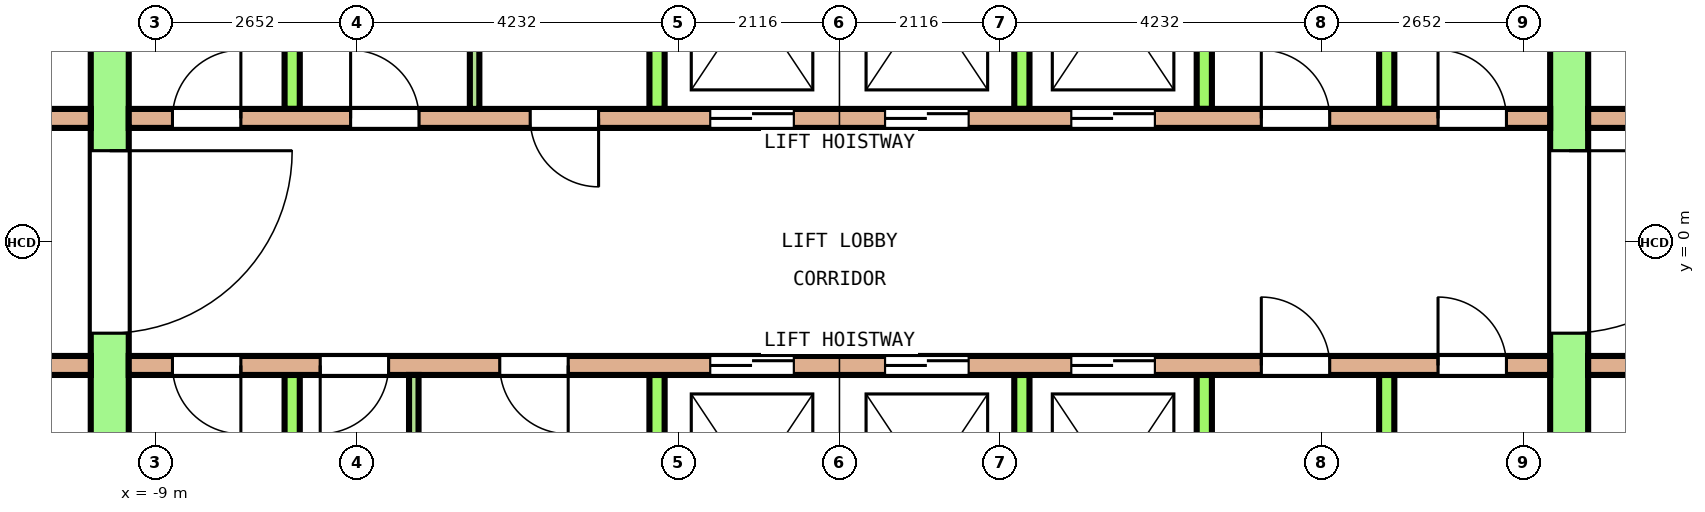
"""IFC4 building model, lengths in metres.
Left out: names, types, materials, properties, quantities, classifications, styles, units other than length and angle.
Written with IfcOpenShell. Run it as: python <this file> out.ifc"""

import sys

from ifc_helpers import new_model, si_unit, direction, frame, frame_2d, origin, place, context, subcontext, project, spatial, rectangle, extrude, element, fill, save


model = new_model("IFC4")
c1 = context("Model", 3, precision=1e-05, world=origin(), true_north=direction((0.0, 1.0)))
c2 = subcontext(c1, "Body", "Model", "MODEL_VIEW")
j1 = project(units=[si_unit("LENGTHUNIT", "METRE"), si_unit("PLANEANGLEUNIT", "RADIAN")], contexts=[c1])
p1 = place(None, origin())
s1 = spatial("IfcSite", under=j1, at=p1, CompositionType="ELEMENT")
p2 = place(p1, origin())
s2 = spatial("IfcBuilding", under=s1, at=p2, CompositionType="ELEMENT")
p3 = place(p2, frame((0.0, 0.0, 237.4)))
s3 = spatial("IfcBuildingStorey", under=s2, at=p3, CompositionType="ELEMENT", Elevation=237.4)
p4 = place(p3, frame((-9.6, -7.8, 0.0), z_axis=(0.0, 0.0, 1.0), x_axis=(0.0, 1.0, 0.0)))
e1 = element("IfcWall", 1, at=p4, inside=s3, PredefinedType="SHEAR", context=c2, shape_type="SweptSolid", body=[
    extrude(rectangle(XDim=15.6, YDim=0.5, at=frame_2d((7.8, 0.0))), origin(), (0.0, 0.0, 1.0), 3.7),
])
p5 = place(p4, frame((6.6, 0.0, 0.0)))
e2 = element("IfcOpeningElement", 2, at=p5, cuts=e1, PredefinedType="OPENING", context=c2, shape_type="SweptSolid", body=[
    extrude(rectangle(XDim=2.4, YDim=2.1, at=frame_2d((1.2, 1.05))), frame((0.0, 0.26, 0.0), z_axis=(0.0, -1.0, 0.0), x_axis=(1.0, 0.0, 0.0)), (0.0, 0.0, 1.0), 0.52),
])
p6 = place(p4, frame((13.5, 0.0, 0.0)))
e3 = element("IfcOpeningElement", 3, at=p6, cuts=e1, PredefinedType="OPENING", context=c2, shape_type="SweptSolid", body=[
    extrude(rectangle(XDim=1.2, YDim=2.1, at=frame_2d((0.6, 1.05))), frame((0.0, 0.26, 0.0), z_axis=(0.0, -1.0, 0.0), x_axis=(1.0, 0.0, 0.0)), (0.0, 0.0, 1.0), 0.52),
])
p7 = place(p4, frame((0.9, 0.0, 0.0)))
e4 = element("IfcOpeningElement", 4, at=p7, cuts=e1, PredefinedType="OPENING", context=c2, shape_type="SweptSolid", body=[
    extrude(rectangle(XDim=1.2, YDim=2.1, at=frame_2d((0.6, 1.05))), frame((0.0, 0.26, 0.0), z_axis=(0.0, -1.0, 0.0), x_axis=(1.0, 0.0, 0.0)), (0.0, 0.0, 1.0), 0.52),
])
p8 = place(p3, frame((9.6, -7.8, 0.0), z_axis=(0.0, 0.0, 1.0), x_axis=(0.0, 1.0, 0.0)))
e5 = element("IfcWall", 5, at=p8, inside=s3, PredefinedType="SHEAR", context=c2, shape_type="SweptSolid", body=[
    extrude(rectangle(XDim=15.6, YDim=0.5, at=frame_2d((7.8, 0.0))), origin(), (0.0, 0.0, 1.0), 3.7),
])
p9 = place(p8, frame((6.6, 0.0, 0.0)))
e6 = element("IfcOpeningElement", 6, at=p9, cuts=e5, PredefinedType="OPENING", context=c2, shape_type="SweptSolid", body=[
    extrude(rectangle(XDim=2.4, YDim=2.1, at=frame_2d((1.2, 1.05))), frame((0.0, 0.26, 0.0), z_axis=(0.0, -1.0, 0.0), x_axis=(1.0, 0.0, 0.0)), (0.0, 0.0, 1.0), 0.52),
])
p10 = place(p8, frame((13.5, 0.0, 0.0)))
e7 = element("IfcOpeningElement", 7, at=p10, cuts=e5, PredefinedType="OPENING", context=c2, shape_type="SweptSolid", body=[
    extrude(rectangle(XDim=1.2, YDim=2.1, at=frame_2d((0.6, 1.05))), frame((0.0, 0.26, 0.0), z_axis=(0.0, -1.0, 0.0), x_axis=(1.0, 0.0, 0.0)), (0.0, 0.0, 1.0), 0.52),
])
p11 = place(p8, frame((1.0, 0.0, 0.0)))
e8 = element("IfcOpeningElement", 8, at=p11, cuts=e5, PredefinedType="OPENING", context=c2, shape_type="SweptSolid", body=[
    extrude(rectangle(XDim=1.0, YDim=2.1, at=frame_2d((0.5, 1.05))), frame((0.0, 0.26, 0.0), z_axis=(0.0, -1.0, 0.0), x_axis=(1.0, 0.0, 0.0)), (0.0, 0.0, 1.0), 0.52),
])
p12 = place(p3, frame((-12.9, 1.625, 0.0), z_axis=(0.0, 0.0, 1.0), x_axis=(1.0, 0.0, 0.0)))
e9 = element("IfcWall", 9, at=p12, inside=s3, PredefinedType="SOLIDWALL", context=c2, shape_type="SweptSolid", body=[
    extrude(rectangle(XDim=3.05, YDim=0.25, at=frame_2d((1.525, 0.0))), origin(), (0.0, 0.0, 1.0), 3.7),
])
p13 = place(p12, frame((1.075, 0.0, 0.0)))
e10 = element("IfcOpeningElement", 10, at=p13, cuts=e9, PredefinedType="OPENING", context=c2, shape_type="SweptSolid", body=[
    extrude(rectangle(XDim=0.9, YDim=2.1, at=frame_2d((0.45, 1.05))), frame((0.0, 0.135, 0.0), z_axis=(0.0, -1.0, 0.0), x_axis=(1.0, 0.0, 0.0)), (0.0, 0.0, 1.0), 0.27),
])
p14 = place(p3, frame((-9.35, 1.625, 0.0), z_axis=(0.0, 0.0, 1.0), x_axis=(1.0, 0.0, 0.0)))
e11 = element("IfcWall", 11, at=p14, inside=s3, PredefinedType="SOLIDWALL", context=c2, shape_type="SweptSolid", body=[
    extrude(rectangle(XDim=18.7, YDim=0.25, at=frame_2d((9.35, 0.0))), origin(), (0.0, 0.0, 1.0), 3.7),
])
p15 = place(p14, frame((7.65, 0.0, 0.0)))
e12 = element("IfcOpeningElement", 12, at=p15, cuts=e11, PredefinedType="OPENING", context=c2, shape_type="SweptSolid", body=[
    extrude(rectangle(XDim=1.1, YDim=2.1, at=frame_2d((0.55, 1.05))), frame((0.0, 0.135, 0.0), z_axis=(0.0, -1.0, 0.0), x_axis=(1.0, 0.0, 0.0)), (0.0, 0.0, 1.0), 0.27),
])
p16 = place(p14, frame((9.95, 0.0, 0.0)))
e13 = element("IfcOpeningElement", 13, at=p16, cuts=e11, PredefinedType="OPENING", context=c2, shape_type="SweptSolid", body=[
    extrude(rectangle(XDim=1.1, YDim=2.1, at=frame_2d((0.55, 1.05))), frame((0.0, 0.135, 0.0), z_axis=(0.0, -1.0, 0.0), x_axis=(1.0, 0.0, 0.0)), (0.0, 0.0, 1.0), 0.27),
])
p17 = place(p14, frame((12.4, 0.0, 0.0)))
e14 = element("IfcOpeningElement", 14, at=p17, cuts=e11, PredefinedType="OPENING", context=c2, shape_type="SweptSolid", body=[
    extrude(rectangle(XDim=1.1, YDim=2.1, at=frame_2d((0.55, 1.05))), frame((0.0, 0.135, 0.0), z_axis=(0.0, -1.0, 0.0), x_axis=(1.0, 0.0, 0.0)), (0.0, 0.0, 1.0), 0.27),
])
p18 = place(p14, frame((0.575, 0.0, 0.0)))
e15 = element("IfcOpeningElement", 15, at=p18, cuts=e11, PredefinedType="OPENING", context=c2, shape_type="SweptSolid", body=[
    extrude(rectangle(XDim=0.9, YDim=2.1, at=frame_2d((0.45, 1.05))), frame((0.0, 0.135, 0.0), z_axis=(0.0, -1.0, 0.0), x_axis=(1.0, 0.0, 0.0)), (0.0, 0.0, 1.0), 0.27),
])
p19 = place(p14, frame((2.919, 0.0, 0.0)))
e16 = element("IfcOpeningElement", 16, at=p19, cuts=e11, PredefinedType="OPENING", context=c2, shape_type="SweptSolid", body=[
    extrude(rectangle(XDim=0.9, YDim=2.1, at=frame_2d((0.45, 1.05))), frame((0.0, 0.135, 0.0), z_axis=(0.0, -1.0, 0.0), x_axis=(1.0, 0.0, 0.0)), (0.0, 0.0, 1.0), 0.27),
])
p20 = place(p14, frame((5.281, 0.0, 0.0)))
e17 = element("IfcOpeningElement", 17, at=p20, cuts=e11, PredefinedType="OPENING", context=c2, shape_type="SweptSolid", body=[
    extrude(rectangle(XDim=0.9, YDim=2.1, at=frame_2d((0.45, 1.05))), frame((0.0, 0.135, 0.0), z_axis=(0.0, -1.0, 0.0), x_axis=(1.0, 0.0, 0.0)), (0.0, 0.0, 1.0), 0.27),
])
p21 = place(p14, frame((14.9, 0.0, 0.0)))
e18 = element("IfcOpeningElement", 18, at=p21, cuts=e11, PredefinedType="OPENING", context=c2, shape_type="SweptSolid", body=[
    extrude(rectangle(XDim=0.9, YDim=2.1, at=frame_2d((0.45, 1.05))), frame((0.0, 0.135, 0.0), z_axis=(0.0, -1.0, 0.0), x_axis=(1.0, 0.0, 0.0)), (0.0, 0.0, 1.0), 0.27),
])
p22 = place(p14, frame((17.225, 0.0, 0.0)))
e19 = element("IfcOpeningElement", 19, at=p22, cuts=e11, PredefinedType="OPENING", context=c2, shape_type="SweptSolid", body=[
    extrude(rectangle(XDim=0.9, YDim=2.1, at=frame_2d((0.45, 1.05))), frame((0.0, 0.135, 0.0), z_axis=(0.0, -1.0, 0.0), x_axis=(1.0, 0.0, 0.0)), (0.0, 0.0, 1.0), 0.27),
])
p23 = place(p3, frame((9.85, 1.625, 0.0), z_axis=(0.0, 0.0, 1.0), x_axis=(1.0, 0.0, 0.0)))
e20 = element("IfcWall", 20, at=p23, inside=s3, PredefinedType="SOLIDWALL", context=c2, shape_type="SweptSolid", body=[
    extrude(rectangle(XDim=3.05, YDim=0.25, at=frame_2d((1.525, 0.0))), origin(), (0.0, 0.0, 1.0), 3.7),
])
p24 = place(p23, frame((1.075, 0.0, 0.0)))
e21 = element("IfcOpeningElement", 21, at=p24, cuts=e20, PredefinedType="OPENING", context=c2, shape_type="SweptSolid", body=[
    extrude(rectangle(XDim=0.9, YDim=2.1, at=frame_2d((0.45, 1.05))), frame((0.0, 0.135, 0.0), z_axis=(0.0, -1.0, 0.0), x_axis=(1.0, 0.0, 0.0)), (0.0, 0.0, 1.0), 0.27),
])
for number, where, z_axis, x_axis in (
    (22, (-7.2, 1.75, 0.0), (0.0, 0.0, 1.0), (0.0, 1.0, 0.0)),
    (23, (-2.4, 1.75, 0.0), (0.0, 0.0, 1.0), (0.0, 1.0, 0.0)),
    (24, (2.4, 1.75, 0.0), (0.0, 0.0, 1.0), (0.0, 1.0, 0.0)),
    (25, (4.8, 1.75, 0.0), (0.0, 0.0, 1.0), (0.0, 1.0, 0.0)),
    (26, (7.2, 1.75, 0.0), (0.0, 0.0, 1.0), (0.0, 1.0, 0.0)),
):
    element("IfcWall", number, at=place(p3, frame(where, z_axis=z_axis, x_axis=x_axis)), inside=s3, PredefinedType="SOLIDWALL", context=c2, shape_type="SweptSolid", body=[
        extrude(rectangle(XDim=2.9, YDim=0.2, at=frame_2d((1.45, 0.0))), origin(), (0.0, 0.0, 1.0), 3.7),
    ])
p25 = place(p3, frame((-12.9, -1.625, 0.0), z_axis=(0.0, 0.0, 1.0), x_axis=(1.0, 0.0, 0.0)))
e27 = element("IfcWall", 27, at=p25, inside=s3, PredefinedType="SOLIDWALL", context=c2, shape_type="SweptSolid", body=[
    extrude(rectangle(XDim=3.05, YDim=0.25, at=frame_2d((1.525, 0.0))), origin(), (0.0, 0.0, 1.0), 3.7),
])
p26 = place(p25, frame((1.075, 0.0, 0.0)))
e28 = element("IfcOpeningElement", 28, at=p26, cuts=e27, PredefinedType="OPENING", context=c2, shape_type="SweptSolid", body=[
    extrude(rectangle(XDim=0.9, YDim=2.1, at=frame_2d((0.45, 1.05))), frame((0.0, 0.135, 0.0), z_axis=(0.0, -1.0, 0.0), x_axis=(1.0, 0.0, 0.0)), (0.0, 0.0, 1.0), 0.27),
])
p27 = place(p3, frame((-9.35, -1.625, 0.0), z_axis=(0.0, 0.0, 1.0), x_axis=(1.0, 0.0, 0.0)))
e29 = element("IfcWall", 29, at=p27, inside=s3, PredefinedType="SOLIDWALL", context=c2, shape_type="SweptSolid", body=[
    extrude(rectangle(XDim=18.7, YDim=0.25, at=frame_2d((9.35, 0.0))), origin(), (0.0, 0.0, 1.0), 3.7),
])
p28 = place(p27, frame((7.65, 0.0, 0.0)))
e30 = element("IfcOpeningElement", 30, at=p28, cuts=e29, PredefinedType="OPENING", context=c2, shape_type="SweptSolid", body=[
    extrude(rectangle(XDim=1.1, YDim=2.1, at=frame_2d((0.55, 1.05))), frame((0.0, 0.135, 0.0), z_axis=(0.0, -1.0, 0.0), x_axis=(1.0, 0.0, 0.0)), (0.0, 0.0, 1.0), 0.27),
])
p29 = place(p27, frame((9.95, 0.0, 0.0)))
e31 = element("IfcOpeningElement", 31, at=p29, cuts=e29, PredefinedType="OPENING", context=c2, shape_type="SweptSolid", body=[
    extrude(rectangle(XDim=1.1, YDim=2.1, at=frame_2d((0.55, 1.05))), frame((0.0, 0.135, 0.0), z_axis=(0.0, -1.0, 0.0), x_axis=(1.0, 0.0, 0.0)), (0.0, 0.0, 1.0), 0.27),
])
p30 = place(p27, frame((12.4, 0.0, 0.0)))
e32 = element("IfcOpeningElement", 32, at=p30, cuts=e29, PredefinedType="OPENING", context=c2, shape_type="SweptSolid", body=[
    extrude(rectangle(XDim=1.1, YDim=2.1, at=frame_2d((0.55, 1.05))), frame((0.0, 0.135, 0.0), z_axis=(0.0, -1.0, 0.0), x_axis=(1.0, 0.0, 0.0)), (0.0, 0.0, 1.0), 0.27),
])
p31 = place(p27, frame((0.575, 0.0, 0.0)))
e33 = element("IfcOpeningElement", 33, at=p31, cuts=e29, PredefinedType="OPENING", context=c2, shape_type="SweptSolid", body=[
    extrude(rectangle(XDim=0.9, YDim=2.1, at=frame_2d((0.45, 1.05))), frame((0.0, 0.135, 0.0), z_axis=(0.0, -1.0, 0.0), x_axis=(1.0, 0.0, 0.0)), (0.0, 0.0, 1.0), 0.27),
])
p32 = place(p27, frame((2.519, 0.0, 0.0)))
e34 = element("IfcOpeningElement", 34, at=p32, cuts=e29, PredefinedType="OPENING", context=c2, shape_type="SweptSolid", body=[
    extrude(rectangle(XDim=0.9, YDim=2.1, at=frame_2d((0.45, 1.05))), frame((0.0, 0.135, 0.0), z_axis=(0.0, -1.0, 0.0), x_axis=(1.0, 0.0, 0.0)), (0.0, 0.0, 1.0), 0.27),
])
p33 = place(p27, frame((4.881, 0.0, 0.0)))
e35 = element("IfcOpeningElement", 35, at=p33, cuts=e29, PredefinedType="OPENING", context=c2, shape_type="SweptSolid", body=[
    extrude(rectangle(XDim=0.9, YDim=2.1, at=frame_2d((0.45, 1.05))), frame((0.0, 0.135, 0.0), z_axis=(0.0, -1.0, 0.0), x_axis=(1.0, 0.0, 0.0)), (0.0, 0.0, 1.0), 0.27),
])
p34 = place(p27, frame((14.9, 0.0, 0.0)))
e36 = element("IfcOpeningElement", 36, at=p34, cuts=e29, PredefinedType="OPENING", context=c2, shape_type="SweptSolid", body=[
    extrude(rectangle(XDim=0.9, YDim=2.1, at=frame_2d((0.45, 1.05))), frame((0.0, 0.135, 0.0), z_axis=(0.0, -1.0, 0.0), x_axis=(1.0, 0.0, 0.0)), (0.0, 0.0, 1.0), 0.27),
])
p35 = place(p27, frame((17.225, 0.0, 0.0)))
e37 = element("IfcOpeningElement", 37, at=p35, cuts=e29, PredefinedType="OPENING", context=c2, shape_type="SweptSolid", body=[
    extrude(rectangle(XDim=0.9, YDim=2.1, at=frame_2d((0.45, 1.05))), frame((0.0, 0.135, 0.0), z_axis=(0.0, -1.0, 0.0), x_axis=(1.0, 0.0, 0.0)), (0.0, 0.0, 1.0), 0.27),
])
p36 = place(p3, frame((9.85, -1.625, 0.0), z_axis=(0.0, 0.0, 1.0), x_axis=(1.0, 0.0, 0.0)))
e38 = element("IfcWall", 38, at=p36, inside=s3, PredefinedType="SOLIDWALL", context=c2, shape_type="SweptSolid", body=[
    extrude(rectangle(XDim=3.05, YDim=0.25, at=frame_2d((1.525, 0.0))), origin(), (0.0, 0.0, 1.0), 3.7),
])
p37 = place(p36, frame((1.075, 0.0, 0.0)))
e39 = element("IfcOpeningElement", 39, at=p37, cuts=e38, PredefinedType="OPENING", context=c2, shape_type="SweptSolid", body=[
    extrude(rectangle(XDim=0.9, YDim=2.1, at=frame_2d((0.45, 1.05))), frame((0.0, 0.135, 0.0), z_axis=(0.0, -1.0, 0.0), x_axis=(1.0, 0.0, 0.0)), (0.0, 0.0, 1.0), 0.27),
])
for number, where, z_axis, x_axis in (
    (40, (-7.2, -4.65, 0.0), (0.0, 0.0, 1.0), (0.0, 1.0, 0.0)),
    (41, (-2.4, -4.65, 0.0), (0.0, 0.0, 1.0), (0.0, 1.0, 0.0)),
    (42, (2.4, -4.65, 0.0), (0.0, 0.0, 1.0), (0.0, 1.0, 0.0)),
    (43, (4.8, -4.65, 0.0), (0.0, 0.0, 1.0), (0.0, 1.0, 0.0)),
    (44, (7.2, -4.65, 0.0), (0.0, 0.0, 1.0), (0.0, 1.0, 0.0)),
):
    element("IfcWall", number, at=place(p3, frame(where, z_axis=z_axis, x_axis=x_axis)), inside=s3, PredefinedType="SOLIDWALL", context=c2, shape_type="SweptSolid", body=[
        extrude(rectangle(XDim=2.9, YDim=0.2, at=frame_2d((1.45, 0.0))), origin(), (0.0, 0.0, 1.0), 3.7),
    ])
for number, where, z_axis, x_axis in (
    (45, (-4.8, 1.75, 0.0), (0.0, 0.0, 1.0), (0.0, 1.0, 0.0)),
    (46, (-5.6, -4.65, 0.0), (0.0, 0.0, 1.0), (0.0, 1.0, 0.0)),
):
    element("IfcWall", number, at=place(p3, frame(where, z_axis=z_axis, x_axis=x_axis)), inside=s3, PredefinedType="PARTITIONING", context=c2, shape_type="SweptSolid", body=[
        extrude(rectangle(XDim=2.9, YDim=0.125, at=frame_2d((1.45, 0.0))), origin(), (0.0, 0.0, 1.0), 3.7),
    ])
p38 = place(p15, origin())
e47 = element("IfcDoor", 47, at=p38, inside=s3, OperationType="DOUBLE_DOOR_SLIDING", PredefinedType="DOOR", context=c2, shape_type="SweptSolid", body=[
    extrude(rectangle(XDim=1.1, YDim=2.1, at=frame_2d((0.55, 1.05))), frame((0.0, 0.075, 0.0), z_axis=(0.0, -1.0, 0.0), x_axis=(1.0, 0.0, 0.0)), (0.0, 0.0, 1.0), 0.15),
])
fill(e12, e47)
p39 = place(p16, origin())
e48 = element("IfcDoor", 48, at=p39, inside=s3, OperationType="DOUBLE_DOOR_SLIDING", PredefinedType="DOOR", context=c2, shape_type="SweptSolid", body=[
    extrude(rectangle(XDim=1.1, YDim=2.1, at=frame_2d((0.55, 1.05))), frame((0.0, 0.075, 0.0), z_axis=(0.0, -1.0, 0.0), x_axis=(1.0, 0.0, 0.0)), (0.0, 0.0, 1.0), 0.15),
])
fill(e13, e48)
p40 = place(p17, origin())
e49 = element("IfcDoor", 49, at=p40, inside=s3, OperationType="DOUBLE_DOOR_SLIDING", PredefinedType="DOOR", context=c2, shape_type="SweptSolid", body=[
    extrude(rectangle(XDim=1.1, YDim=2.1, at=frame_2d((0.55, 1.05))), frame((0.0, 0.075, 0.0), z_axis=(0.0, -1.0, 0.0), x_axis=(1.0, 0.0, 0.0)), (0.0, 0.0, 1.0), 0.15),
])
fill(e14, e49)
p41 = place(p28, origin())
e50 = element("IfcDoor", 50, at=p41, inside=s3, OperationType="DOUBLE_DOOR_SLIDING", PredefinedType="DOOR", context=c2, shape_type="SweptSolid", body=[
    extrude(rectangle(XDim=1.1, YDim=2.1, at=frame_2d((0.55, 1.05))), frame((0.0, 0.075, 0.0), z_axis=(0.0, -1.0, 0.0), x_axis=(1.0, 0.0, 0.0)), (0.0, 0.0, 1.0), 0.15),
])
fill(e30, e50)
p42 = place(p29, origin())
e51 = element("IfcDoor", 51, at=p42, inside=s3, OperationType="DOUBLE_DOOR_SLIDING", PredefinedType="DOOR", context=c2, shape_type="SweptSolid", body=[
    extrude(rectangle(XDim=1.1, YDim=2.1, at=frame_2d((0.55, 1.05))), frame((0.0, 0.075, 0.0), z_axis=(0.0, -1.0, 0.0), x_axis=(1.0, 0.0, 0.0)), (0.0, 0.0, 1.0), 0.15),
])
fill(e31, e51)
p43 = place(p30, origin())
e52 = element("IfcDoor", 52, at=p43, inside=s3, OperationType="DOUBLE_DOOR_SLIDING", PredefinedType="DOOR", context=c2, shape_type="SweptSolid", body=[
    extrude(rectangle(XDim=1.1, YDim=2.1, at=frame_2d((0.55, 1.05))), frame((0.0, 0.075, 0.0), z_axis=(0.0, -1.0, 0.0), x_axis=(1.0, 0.0, 0.0)), (0.0, 0.0, 1.0), 0.15),
])
fill(e32, e52)
p44 = place(p5, origin())
e53 = element("IfcDoor", 53, at=p44, inside=s3, OperationType="DOUBLE_DOOR_SINGLE_SWING", PredefinedType="DOOR", context=c2, shape_type="SweptSolid", body=[
    extrude(rectangle(XDim=2.4, YDim=2.1, at=frame_2d((1.2, 1.05))), frame((0.0, 0.2, 0.0), z_axis=(0.0, -1.0, 0.0), x_axis=(1.0, 0.0, 0.0)), (0.0, 0.0, 1.0), 0.4),
])
fill(e2, e53)
p45 = place(p9, origin())
e54 = element("IfcDoor", 54, at=p45, inside=s3, OperationType="DOUBLE_DOOR_SINGLE_SWING", PredefinedType="DOOR", context=c2, shape_type="SweptSolid", body=[
    extrude(rectangle(XDim=2.4, YDim=2.1, at=frame_2d((1.2, 1.05))), frame((0.0, 0.2, 0.0), z_axis=(0.0, -1.0, 0.0), x_axis=(1.0, 0.0, 0.0)), (0.0, 0.0, 1.0), 0.4),
])
fill(e6, e54)
p46 = place(p18, origin())
e55 = element("IfcDoor", 55, at=p46, inside=s3, OperationType="SINGLE_SWING_LEFT", PredefinedType="DOOR", context=c2, shape_type="SweptSolid", body=[
    extrude(rectangle(XDim=0.9, YDim=2.1, at=frame_2d((0.45, 1.05))), frame((0.0, 0.075, 0.0), z_axis=(0.0, -1.0, 0.0), x_axis=(1.0, 0.0, 0.0)), (0.0, 0.0, 1.0), 0.15),
])
fill(e15, e55)
p47 = place(p19, origin())
e56 = element("IfcDoor", 56, at=p47, inside=s3, OperationType="SINGLE_SWING_RIGHT", PredefinedType="DOOR", context=c2, shape_type="SweptSolid", body=[
    extrude(rectangle(XDim=0.9, YDim=2.1, at=frame_2d((0.45, 1.05))), frame((0.0, 0.075, 0.0), z_axis=(0.0, -1.0, 0.0), x_axis=(1.0, 0.0, 0.0)), (0.0, 0.0, 1.0), 0.15),
])
fill(e16, e56)
p48 = place(p20, origin())
e57 = element("IfcDoor", 57, at=p48, inside=s3, OperationType="SINGLE_SWING_LEFT", PredefinedType="DOOR", context=c2, shape_type="SweptSolid", body=[
    extrude(rectangle(XDim=0.9, YDim=2.1, at=frame_2d((0.45, 1.05))), frame((0.0, 0.075, 0.0), z_axis=(0.0, -1.0, 0.0), x_axis=(1.0, 0.0, 0.0)), (0.0, 0.0, 1.0), 0.15),
])
fill(e17, e57)
p49 = place(p21, origin())
e58 = element("IfcDoor", 58, at=p49, inside=s3, OperationType="SINGLE_SWING_RIGHT", PredefinedType="DOOR", context=c2, shape_type="SweptSolid", body=[
    extrude(rectangle(XDim=0.9, YDim=2.1, at=frame_2d((0.45, 1.05))), frame((0.0, 0.075, 0.0), z_axis=(0.0, -1.0, 0.0), x_axis=(1.0, 0.0, 0.0)), (0.0, 0.0, 1.0), 0.15),
])
fill(e18, e58)
p50 = place(p22, origin())
e59 = element("IfcDoor", 59, at=p50, inside=s3, OperationType="SINGLE_SWING_LEFT", PredefinedType="DOOR", context=c2, shape_type="SweptSolid", body=[
    extrude(rectangle(XDim=0.9, YDim=2.1, at=frame_2d((0.45, 1.05))), frame((0.0, 0.075, 0.0), z_axis=(0.0, -1.0, 0.0), x_axis=(1.0, 0.0, 0.0)), (0.0, 0.0, 1.0), 0.15),
])
fill(e19, e59)
p51 = place(p31, origin())
e60 = element("IfcDoor", 60, at=p51, inside=s3, OperationType="SINGLE_SWING_RIGHT", PredefinedType="DOOR", context=c2, shape_type="SweptSolid", body=[
    extrude(rectangle(XDim=0.9, YDim=2.1, at=frame_2d((0.45, 1.05))), frame((0.0, 0.075, 0.0), z_axis=(0.0, -1.0, 0.0), x_axis=(1.0, 0.0, 0.0)), (0.0, 0.0, 1.0), 0.15),
])
fill(e33, e60)
p52 = place(p32, origin())
e61 = element("IfcDoor", 61, at=p52, inside=s3, OperationType="SINGLE_SWING_LEFT", PredefinedType="DOOR", context=c2, shape_type="SweptSolid", body=[
    extrude(rectangle(XDim=0.9, YDim=2.1, at=frame_2d((0.45, 1.05))), frame((0.0, 0.075, 0.0), z_axis=(0.0, -1.0, 0.0), x_axis=(1.0, 0.0, 0.0)), (0.0, 0.0, 1.0), 0.15),
])
fill(e34, e61)
p53 = place(p33, origin())
e62 = element("IfcDoor", 62, at=p53, inside=s3, OperationType="SINGLE_SWING_RIGHT", PredefinedType="DOOR", context=c2, shape_type="SweptSolid", body=[
    extrude(rectangle(XDim=0.9, YDim=2.1, at=frame_2d((0.45, 1.05))), frame((0.0, 0.075, 0.0), z_axis=(0.0, -1.0, 0.0), x_axis=(1.0, 0.0, 0.0)), (0.0, 0.0, 1.0), 0.15),
])
fill(e35, e62)
p54 = place(p34, origin())
e63 = element("IfcDoor", 63, at=p54, inside=s3, OperationType="SINGLE_SWING_LEFT", PredefinedType="DOOR", context=c2, shape_type="SweptSolid", body=[
    extrude(rectangle(XDim=0.9, YDim=2.1, at=frame_2d((0.45, 1.05))), frame((0.0, 0.075, 0.0), z_axis=(0.0, -1.0, 0.0), x_axis=(1.0, 0.0, 0.0)), (0.0, 0.0, 1.0), 0.15),
])
fill(e36, e63)
p55 = place(p35, origin())
e64 = element("IfcDoor", 64, at=p55, inside=s3, OperationType="SINGLE_SWING_RIGHT", PredefinedType="DOOR", context=c2, shape_type="SweptSolid", body=[
    extrude(rectangle(XDim=0.9, YDim=2.1, at=frame_2d((0.45, 1.05))), frame((0.0, 0.075, 0.0), z_axis=(0.0, -1.0, 0.0), x_axis=(1.0, 0.0, 0.0)), (0.0, 0.0, 1.0), 0.15),
])
fill(e37, e64)
save(model, sys.argv[1])
